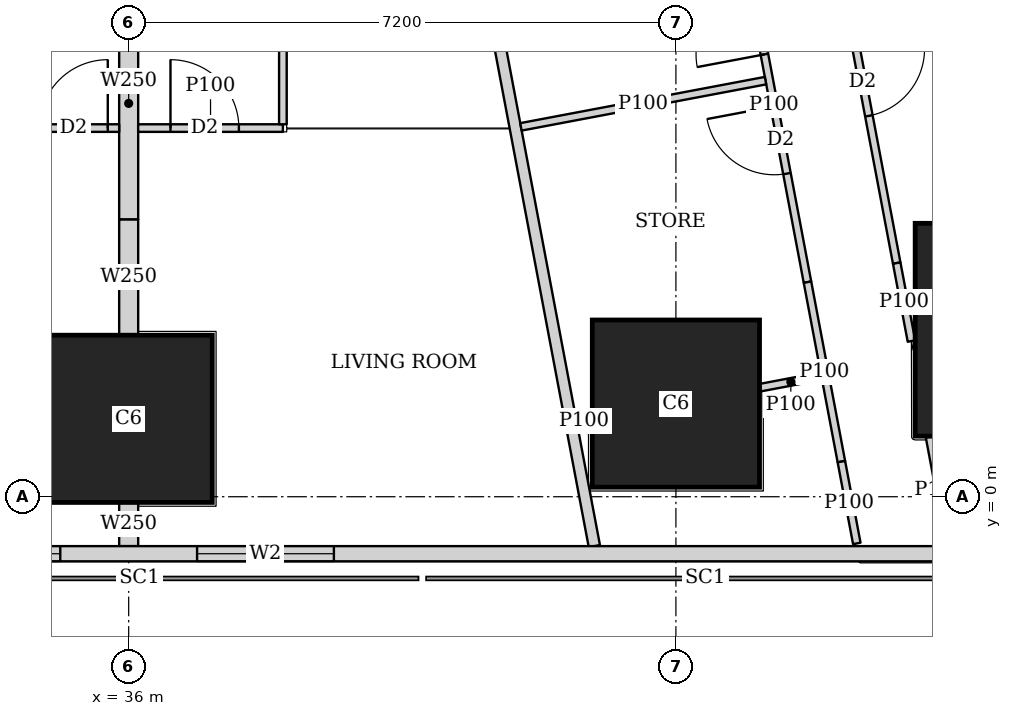
"""IFC4 building model, lengths in metres.
Left out: names, types, materials, properties, quantities, classifications, styles, units other than length and angle.
Written with IfcOpenShell. Run it as: python <this file> out.ifc"""

import sys

from ifc_helpers import new_model, si_unit, direction, frame, frame_2d, origin, origin_2d, place, context, subcontext, project, spatial, rectangle, extrude, element, fill, save


model = new_model("IFC4")
c1 = context("Model", 3, precision=1e-05, world=origin(), true_north=direction((0.0, 1.0)))
c2 = subcontext(c1, "Body", "Model", "MODEL_VIEW")
j1 = project(units=[si_unit("LENGTHUNIT", "METRE"), si_unit("PLANEANGLEUNIT", "RADIAN")], contexts=[c1])
p1 = place(None, origin())
s1 = spatial("IfcSite", under=j1, at=p1, CompositionType="ELEMENT")
p2 = place(p1, origin())
s2 = spatial("IfcBuilding", under=s1, at=p2, CompositionType="ELEMENT")
p3 = place(p2, frame((0.0, 0.0, 122.9)))
s3 = spatial("IfcBuildingStorey", under=s2, at=p3, CompositionType="ELEMENT", Elevation=122.9)
for number, where, z_axis, x_axis in (
    (1, (36.0, 1.025, 0.0), (0.0, 0.0, 1.0), (1.0, 0.0, 0.0)),
    (2, (43.2, 1.225, 0.0), (0.0, 0.0, 1.0), (1.0, 0.0, 0.0)),
):
    element("IfcColumn", number, at=place(p3, frame(where, z_axis=z_axis, x_axis=x_axis)), inside=s3, PredefinedType="COLUMN", context=c2, shape_type="SweptSolid", body=[
        extrude(rectangle(XDim=2.2, YDim=2.2, at=origin_2d()), origin(), (0.0, 0.0, 1.0), 3.75),
    ])
p4 = place(p3, frame((47.748, 2.197, 0.0), z_axis=(0.0, 0.0, 1.0), x_axis=(1.0, 0.0, 0.0)))
e3 = element("IfcColumn", 3, at=p4, inside=s3, PredefinedType="COLUMN", context=c2, shape_type="SweptSolid", body=[
    extrude(rectangle(XDim=2.8, YDim=2.8, at=origin_2d()), origin(), (0.0, 0.0, 1.0), 3.75),
])
p5 = place(p3, frame((2.163, -0.75, 0.0), z_axis=(0.0, 0.0, 1.0), x_axis=(1.0, 0.0, 0.0)))
e4 = element("IfcWall", 4, at=p5, inside=s3, PredefinedType="SOLIDWALL", context=c2, shape_type="SweptSolid", body=[
    extrude(rectangle(XDim=45.628, YDim=0.2, at=frame_2d((22.814, 0.0))), origin(), (0.0, 0.0, 1.0), 3.5),
])
p6 = place(p5, frame((9.537, 0.0, 0.9)))
e5 = element("IfcOpeningElement", 5, at=p6, cuts=e4, PredefinedType="OPENING", context=c2, shape_type="SweptSolid", body=[
    extrude(rectangle(XDim=1.8, YDim=1.5, at=frame_2d((0.9, 0.75))), frame((0.0, 0.11, 0.0), z_axis=(0.0, -1.0, 0.0), x_axis=(1.0, 0.0, 0.0)), (0.0, 0.0, 1.0), 0.22),
])
p7 = place(p5, frame((13.137, 0.0, 0.9)))
e6 = element("IfcOpeningElement", 6, at=p7, cuts=e4, PredefinedType="OPENING", context=c2, shape_type="SweptSolid", body=[
    extrude(rectangle(XDim=1.8, YDim=1.5, at=frame_2d((0.9, 0.75))), frame((0.0, 0.11, 0.0), z_axis=(0.0, -1.0, 0.0), x_axis=(1.0, 0.0, 0.0)), (0.0, 0.0, 1.0), 0.22),
])
p8 = place(p5, frame((16.737, 0.0, 0.9)))
e7 = element("IfcOpeningElement", 7, at=p8, cuts=e4, PredefinedType="OPENING", context=c2, shape_type="SweptSolid", body=[
    extrude(rectangle(XDim=1.8, YDim=1.5, at=frame_2d((0.9, 0.75))), frame((0.0, 0.11, 0.0), z_axis=(0.0, -1.0, 0.0), x_axis=(1.0, 0.0, 0.0)), (0.0, 0.0, 1.0), 0.22),
])
p9 = place(p5, frame((20.337, 0.0, 0.9)))
e8 = element("IfcOpeningElement", 8, at=p9, cuts=e4, PredefinedType="OPENING", context=c2, shape_type="SweptSolid", body=[
    extrude(rectangle(XDim=1.8, YDim=1.5, at=frame_2d((0.9, 0.75))), frame((0.0, 0.11, 0.0), z_axis=(0.0, -1.0, 0.0), x_axis=(1.0, 0.0, 0.0)), (0.0, 0.0, 1.0), 0.22),
])
p10 = place(p5, frame((23.937, 0.0, 0.9)))
e9 = element("IfcOpeningElement", 9, at=p10, cuts=e4, PredefinedType="OPENING", context=c2, shape_type="SweptSolid", body=[
    extrude(rectangle(XDim=1.8, YDim=1.5, at=frame_2d((0.9, 0.75))), frame((0.0, 0.11, 0.0), z_axis=(0.0, -1.0, 0.0), x_axis=(1.0, 0.0, 0.0)), (0.0, 0.0, 1.0), 0.22),
])
p11 = place(p5, frame((27.537, 0.0, 0.9)))
e10 = element("IfcOpeningElement", 10, at=p11, cuts=e4, PredefinedType="OPENING", context=c2, shape_type="SweptSolid", body=[
    extrude(rectangle(XDim=1.8, YDim=1.5, at=frame_2d((0.9, 0.75))), frame((0.0, 0.11, 0.0), z_axis=(0.0, -1.0, 0.0), x_axis=(1.0, 0.0, 0.0)), (0.0, 0.0, 1.0), 0.22),
])
p12 = place(p5, frame((31.137, 0.0, 0.9)))
e11 = element("IfcOpeningElement", 11, at=p12, cuts=e4, PredefinedType="OPENING", context=c2, shape_type="SweptSolid", body=[
    extrude(rectangle(XDim=1.8, YDim=1.5, at=frame_2d((0.9, 0.75))), frame((0.0, 0.11, 0.0), z_axis=(0.0, -1.0, 0.0), x_axis=(1.0, 0.0, 0.0)), (0.0, 0.0, 1.0), 0.22),
])
p13 = place(p5, frame((34.737, 0.0, 0.9)))
e12 = element("IfcOpeningElement", 12, at=p13, cuts=e4, PredefinedType="OPENING", context=c2, shape_type="SweptSolid", body=[
    extrude(rectangle(XDim=1.8, YDim=1.5, at=frame_2d((0.9, 0.75))), frame((0.0, 0.11, 0.0), z_axis=(0.0, -1.0, 0.0), x_axis=(1.0, 0.0, 0.0)), (0.0, 0.0, 1.0), 0.22),
])
p14 = place(p3, frame((50.653, 2.703, 0.0), z_axis=(0.0, 0.0, 1.0), x_axis=(-0.185612026696, 0.982623109613, 0.0)))
e13 = element("IfcWall", 13, at=p14, inside=s3, PredefinedType="SOLIDWALL", context=c2, shape_type="SweptSolid", body=[
    extrude(rectangle(XDim=41.393, YDim=0.2, at=frame_2d((20.697, 0.0))), origin(), (0.0, 0.0, 1.0), 3.5),
])
p15 = place(p14, frame((1.633, 0.0, 0.9)))
e14 = element("IfcOpeningElement", 14, at=p15, cuts=e13, PredefinedType="OPENING", context=c2, shape_type="SweptSolid", body=[
    extrude(rectangle(XDim=1.8, YDim=1.5, at=frame_2d((0.9, 0.75))), frame((0.0, 0.11, 0.0), z_axis=(0.0, -1.0, 0.0), x_axis=(1.0, 0.0, 0.0)), (0.0, 0.0, 1.0), 0.22),
])
p16 = place(p14, frame((6.032, 0.0, 0.9)))
e15 = element("IfcOpeningElement", 15, at=p16, cuts=e13, PredefinedType="OPENING", context=c2, shape_type="SweptSolid", body=[
    extrude(rectangle(XDim=1.8, YDim=1.5, at=frame_2d((0.9, 0.75))), frame((0.0, 0.11, 0.0), z_axis=(0.0, -1.0, 0.0), x_axis=(1.0, 0.0, 0.0)), (0.0, 0.0, 1.0), 0.22),
])
p17 = place(p14, frame((9.848, 0.0, 0.9)))
e16 = element("IfcOpeningElement", 16, at=p17, cuts=e13, PredefinedType="OPENING", context=c2, shape_type="SweptSolid", body=[
    extrude(rectangle(XDim=1.8, YDim=1.5, at=frame_2d((0.9, 0.75))), frame((0.0, 0.11, 0.0), z_axis=(0.0, -1.0, 0.0), x_axis=(1.0, 0.0, 0.0)), (0.0, 0.0, 1.0), 0.22),
])
p18 = place(p14, frame((13.664, 0.0, 0.9)))
e17 = element("IfcOpeningElement", 17, at=p18, cuts=e13, PredefinedType="OPENING", context=c2, shape_type="SweptSolid", body=[
    extrude(rectangle(XDim=1.8, YDim=1.5, at=frame_2d((0.9, 0.75))), frame((0.0, 0.11, 0.0), z_axis=(0.0, -1.0, 0.0), x_axis=(1.0, 0.0, 0.0)), (0.0, 0.0, 1.0), 0.22),
])
p19 = place(p14, frame((17.481, 0.0, 0.9)))
e18 = element("IfcOpeningElement", 18, at=p19, cuts=e13, PredefinedType="OPENING", context=c2, shape_type="SweptSolid", body=[
    extrude(rectangle(XDim=1.8, YDim=1.5, at=frame_2d((0.9, 0.75))), frame((0.0, 0.11, 0.0), z_axis=(0.0, -1.0, 0.0), x_axis=(1.0, 0.0, 0.0)), (0.0, 0.0, 1.0), 0.22),
])
p20 = place(p14, frame((21.297, 0.0, 0.9)))
e19 = element("IfcOpeningElement", 19, at=p20, cuts=e13, PredefinedType="OPENING", context=c2, shape_type="SweptSolid", body=[
    extrude(rectangle(XDim=1.8, YDim=1.5, at=frame_2d((0.9, 0.75))), frame((0.0, 0.11, 0.0), z_axis=(0.0, -1.0, 0.0), x_axis=(1.0, 0.0, 0.0)), (0.0, 0.0, 1.0), 0.22),
])
p21 = place(p14, frame((25.113, 0.0, 0.9)))
e20 = element("IfcOpeningElement", 20, at=p21, cuts=e13, PredefinedType="OPENING", context=c2, shape_type="SweptSolid", body=[
    extrude(rectangle(XDim=1.8, YDim=1.5, at=frame_2d((0.9, 0.75))), frame((0.0, 0.11, 0.0), z_axis=(0.0, -1.0, 0.0), x_axis=(1.0, 0.0, 0.0)), (0.0, 0.0, 1.0), 0.22),
])
p22 = place(p14, frame((28.93, 0.0, 0.9)))
e21 = element("IfcOpeningElement", 21, at=p22, cuts=e13, PredefinedType="OPENING", context=c2, shape_type="SweptSolid", body=[
    extrude(rectangle(XDim=1.8, YDim=1.5, at=frame_2d((0.9, 0.75))), frame((0.0, 0.11, 0.0), z_axis=(0.0, -1.0, 0.0), x_axis=(1.0, 0.0, 0.0)), (0.0, 0.0, 1.0), 0.22),
])
p23 = place(p14, frame((32.746, 0.0, 0.9)))
e22 = element("IfcOpeningElement", 22, at=p23, cuts=e13, PredefinedType="OPENING", context=c2, shape_type="SweptSolid", body=[
    extrude(rectangle(XDim=1.8, YDim=1.5, at=frame_2d((0.9, 0.75))), frame((0.0, 0.11, 0.0), z_axis=(0.0, -1.0, 0.0), x_axis=(1.0, 0.0, 0.0)), (0.0, 0.0, 1.0), 0.22),
])
p24 = place(p14, frame((36.481, 0.0, 0.9)))
e23 = element("IfcOpeningElement", 23, at=p24, cuts=e13, PredefinedType="OPENING", context=c2, shape_type="SweptSolid", body=[
    extrude(rectangle(XDim=1.8, YDim=1.5, at=frame_2d((0.9, 0.75))), frame((0.0, 0.11, 0.0), z_axis=(0.0, -1.0, 0.0), x_axis=(1.0, 0.0, 0.0)), (0.0, 0.0, 1.0), 0.22),
])
p25 = place(p3, frame((33.382, 45.65, 0.0), z_axis=(0.0, 0.0, 1.0), x_axis=(0.185593544777, -0.982626600565, 0.0)))
e24 = element("IfcWall", 24, at=p25, inside=s3, PredefinedType="SOLIDWALL", context=c2, shape_type="SweptSolid", body=[
    extrude(rectangle(XDim=47.118, YDim=0.15, at=frame_2d((23.559, 0.0))), origin(), (0.0, 0.0, 1.0), 2.2),
])
p26 = place(p25, frame((10.662, 0.0, 0.0)))
e25 = element("IfcOpeningElement", 25, at=p26, cuts=e24, PredefinedType="OPENING", context=c2, shape_type="SweptSolid", body=[
    extrude(rectangle(XDim=1.0, YDim=2.1, at=frame_2d((0.5, 1.05))), frame((0.0, 0.085, 0.0), z_axis=(0.0, -1.0, 0.0), x_axis=(1.0, 0.0, 0.0)), (0.0, 0.0, 1.0), 0.17),
])
p27 = place(p25, frame((15.237, 0.0, 0.0)))
e26 = element("IfcOpeningElement", 26, at=p27, cuts=e24, PredefinedType="OPENING", context=c2, shape_type="SweptSolid", body=[
    extrude(rectangle(XDim=1.0, YDim=2.1, at=frame_2d((0.5, 1.05))), frame((0.0, 0.085, 0.0), z_axis=(0.0, -1.0, 0.0), x_axis=(1.0, 0.0, 0.0)), (0.0, 0.0, 1.0), 0.17),
])
p28 = place(p25, frame((22.87, 0.0, 0.0)))
e27 = element("IfcOpeningElement", 27, at=p28, cuts=e24, PredefinedType="OPENING", context=c2, shape_type="SweptSolid", body=[
    extrude(rectangle(XDim=1.0, YDim=2.1, at=frame_2d((0.5, 1.05))), frame((0.0, 0.085, 0.0), z_axis=(0.0, -1.0, 0.0), x_axis=(1.0, 0.0, 0.0)), (0.0, 0.0, 1.0), 0.17),
])
p29 = place(p25, frame((33.833, 0.0, 0.0)))
e28 = element("IfcOpeningElement", 28, at=p29, cuts=e24, PredefinedType="OPENING", context=c2, shape_type="SweptSolid", body=[
    extrude(rectangle(XDim=1.0, YDim=2.1, at=frame_2d((0.5, 1.05))), frame((0.0, 0.085, 0.0), z_axis=(0.0, -1.0, 0.0), x_axis=(1.0, 0.0, 0.0)), (0.0, 0.0, 1.0), 0.17),
])
p30 = place(p3, frame((35.875, 4.85, 0.0), z_axis=(0.0, 0.0, 1.0), x_axis=(-1.0, 0.0, 0.0)))
e29 = element("IfcWall", 29, at=p30, inside=s3, PredefinedType="PARTITIONING", context=c2, shape_type="SweptSolid", body=[
    extrude(rectangle(XDim=3.475, YDim=0.1, at=frame_2d((1.738, 0.0))), origin(), (0.0, 0.0, 1.0), 3.5),
])
p31 = place(p30, frame((1.92, 0.0, 0.0)))
e30 = element("IfcOpeningElement", 30, at=p31, cuts=e29, PredefinedType="OPENING", context=c2, shape_type="SweptSolid", body=[
    extrude(rectangle(XDim=0.9, YDim=2.1, at=frame_2d((0.45, 1.05))), frame((0.0, 0.06, 0.0), z_axis=(0.0, -1.0, 0.0), x_axis=(1.0, 0.0, 0.0)), (0.0, 0.0, 1.0), 0.12),
])
p32 = place(p30, frame((0.15, 0.0, 0.0)))
e31 = element("IfcOpeningElement", 31, at=p32, cuts=e29, PredefinedType="OPENING", context=c2, shape_type="SweptSolid", body=[
    extrude(rectangle(XDim=0.9, YDim=2.1, at=frame_2d((0.45, 1.05))), frame((0.0, 0.06, 0.0), z_axis=(0.0, -1.0, 0.0), x_axis=(1.0, 0.0, 0.0)), (0.0, 0.0, 1.0), 0.12),
])
p33 = place(p3, frame((38.029, 4.85, 0.0), z_axis=(0.0, 0.0, 1.0), x_axis=(-1.0, 0.0, 0.0)))
e32 = element("IfcWall", 32, at=p33, inside=s3, PredefinedType="PARTITIONING", context=c2, shape_type="SweptSolid", body=[
    extrude(rectangle(XDim=1.904, YDim=0.1, at=frame_2d((0.952, 0.0))), origin(), (0.0, 0.0, 1.0), 3.5),
])
p34 = place(p33, frame((0.579, 0.0, 0.0)))
e33 = element("IfcOpeningElement", 33, at=p34, cuts=e32, PredefinedType="OPENING", context=c2, shape_type="SweptSolid", body=[
    extrude(rectangle(XDim=0.9, YDim=2.1, at=frame_2d((0.45, 1.05))), frame((0.0, 0.06, 0.0), z_axis=(0.0, -1.0, 0.0), x_axis=(1.0, 0.0, 0.0)), (0.0, 0.0, 1.0), 0.12),
])
p35 = place(p3, frame((38.029, 4.9, 0.0), z_axis=(0.0, 0.0, 1.0), x_axis=(0.0, 1.0, 0.0)))
e34 = element("IfcWall", 34, at=p35, inside=s3, PredefinedType="PARTITIONING", context=c2, shape_type="SweptSolid", body=[
    extrude(rectangle(XDim=3.275, YDim=0.1, at=frame_2d((1.638, 0.0))), origin(), (0.0, 0.0, 1.0), 3.5),
])
p36 = place(p3, frame((36.0, -0.65, 0.0), z_axis=(0.0, 0.0, 1.0), x_axis=(0.0, 1.0, 0.0)))
e35 = element("IfcWall", 35, at=p36, inside=s3, PredefinedType="SOLIDWALL", context=c2, shape_type="SweptSolid", body=[
    extrude(rectangle(XDim=0.574, YDim=0.25, at=frame_2d((0.287, 0.0))), origin(), (0.0, 0.0, 1.0), 3.5),
])
p37 = place(p3, frame((36.0, 2.126, 0.0), z_axis=(0.0, 0.0, 1.0), x_axis=(0.0, 1.0, 0.0)))
e36 = element("IfcWall", 36, at=p37, inside=s3, PredefinedType="SOLIDWALL", context=c2, shape_type="SweptSolid", body=[
    extrude(rectangle(XDim=1.524, YDim=0.25, at=frame_2d((0.762, 0.0))), origin(), (0.0, 0.0, 1.0), 3.5),
])
p38 = place(p3, frame((36.0, 3.65, 0.0), z_axis=(0.0, 0.0, 1.0), x_axis=(0.0, 1.0, 0.0)))
e37 = element("IfcWall", 37, at=p38, inside=s3, PredefinedType="SOLIDWALL", context=c2, shape_type="SweptSolid", body=[
    extrude(rectangle(XDim=3.049, YDim=0.25, at=frame_2d((1.524, 0.0))), origin(), (0.0, 0.0, 1.0), 3.5),
])
p39 = place(p3, frame((44.727, 10.366, 0.0), z_axis=(0.0, 0.0, 1.0), x_axis=(0.185678775129, -0.982610498858, 0.0)))
e38 = element("IfcWall", 38, at=p39, inside=s3, PredefinedType="PARTITIONING", context=c2, shape_type="SweptSolid", body=[
    extrude(rectangle(XDim=7.421, YDim=0.1, at=frame_2d((3.71, 0.0))), origin(), (0.0, 0.0, 1.0), 3.5),
])
p40 = place(p39, frame((0.151, 0.0, 0.0)))
e39 = element("IfcOpeningElement", 39, at=p40, cuts=e38, PredefinedType="OPENING", context=c2, shape_type="SweptSolid", body=[
    extrude(rectangle(XDim=0.9, YDim=2.1, at=frame_2d((0.45, 1.05))), frame((0.0, 0.06, 0.0), z_axis=(0.0, -1.0, 0.0), x_axis=(1.0, 0.0, 0.0)), (0.0, 0.0, 1.0), 0.12),
])
p41 = place(p39, frame((4.55, 0.0, 0.0)))
e40 = element("IfcOpeningElement", 40, at=p41, cuts=e38, PredefinedType="OPENING", context=c2, shape_type="SweptSolid", body=[
    extrude(rectangle(XDim=0.9, YDim=2.1, at=frame_2d((0.45, 1.05))), frame((0.0, 0.06, 0.0), z_axis=(0.0, -1.0, 0.0), x_axis=(1.0, 0.0, 0.0)), (0.0, 0.0, 1.0), 0.12),
])
p42 = place(p3, frame((46.105, 3.074, 0.0), z_axis=(0.0, 0.0, 1.0), x_axis=(0.185897769544, -0.982569091351, 0.0)))
e41 = element("IfcWall", 41, at=p42, inside=s3, PredefinedType="PARTITIONING", context=c2, shape_type="SweptSolid", body=[
    extrude(rectangle(XDim=1.044, YDim=0.1, at=frame_2d((0.522, 0.0))), origin(), (0.0, 0.0, 1.0), 2.05),
])
p43 = place(p3, frame((46.537, 0.787, 0.0), z_axis=(0.0, 0.0, 1.0), x_axis=(0.185348284603, -0.982672892368, 0.0)))
e42 = element("IfcWall", 42, at=p43, inside=s3, PredefinedType="PARTITIONING", context=c2, shape_type="SweptSolid", body=[
    extrude(rectangle(XDim=1.419, YDim=0.1, at=frame_2d((0.709, 0.0))), origin(), (0.0, 0.0, 1.0), 2.05),
])
p44 = place(p3, frame((44.049, 7.49, 0.0), z_axis=(0.0, 0.0, 1.0), x_axis=(0.185666332607, -0.982612849975, 0.0)))
e43 = element("IfcWall", 43, at=p44, inside=s3, PredefinedType="PARTITIONING", context=c2, shape_type="SweptSolid", body=[
    extrude(rectangle(XDim=4.75, YDim=0.1, at=frame_2d((2.375, 0.0))), origin(), (0.0, 0.0, 1.0), 3.5),
])
p45 = place(p44, frame((0.8, 0.0, 0.0)))
e44 = element("IfcOpeningElement", 44, at=p45, cuts=e43, PredefinedType="OPENING", context=c2, shape_type="SweptSolid", body=[
    extrude(rectangle(XDim=0.9, YDim=2.1, at=frame_2d((0.45, 1.05))), frame((0.0, 0.06, 0.0), z_axis=(0.0, -1.0, 0.0), x_axis=(1.0, 0.0, 0.0)), (0.0, 0.0, 1.0), 0.12),
])
p46 = place(p44, frame((2.396, 0.0, 0.0)))
e45 = element("IfcOpeningElement", 45, at=p46, cuts=e43, PredefinedType="OPENING", context=c2, shape_type="SweptSolid", body=[
    extrude(rectangle(XDim=0.9, YDim=2.1, at=frame_2d((0.45, 1.05))), frame((0.0, 0.06, 0.0), z_axis=(0.0, -1.0, 0.0), x_axis=(1.0, 0.0, 0.0)), (0.0, 0.0, 1.0), 0.12),
])
p47 = place(p3, frame((44.931, 2.823, 0.0), z_axis=(0.0, 0.0, 1.0), x_axis=(0.185631845838, -0.982619365681, 0.0)))
e46 = element("IfcWall", 46, at=p47, inside=s3, PredefinedType="PARTITIONING", context=c2, shape_type="SweptSolid", body=[
    extrude(rectangle(XDim=2.403, YDim=0.1, at=frame_2d((1.201, 0.0))), origin(), (0.0, 0.0, 1.0), 2.05),
])
p48 = place(p3, frame((45.377, 0.462, 0.0), z_axis=(0.0, 0.0, 1.0), x_axis=(0.185513480919, -0.982641719243, 0.0)))
e47 = element("IfcWall", 47, at=p48, inside=s3, PredefinedType="PARTITIONING", context=c2, shape_type="SweptSolid", body=[
    extrude(rectangle(XDim=1.095, YDim=0.1, at=frame_2d((0.547, 0.0))), origin(), (0.0, 0.0, 1.0), 3.5),
])
p49 = place(p3, frame((45.114, 1.587, 0.0), z_axis=(0.0, 0.0, 1.0), x_axis=(-0.982624706348, -0.185603573443, 0.0)))
e48 = element("IfcWall", 48, at=p49, inside=s3, PredefinedType="PARTITIONING", context=c2, shape_type="SweptSolid", body=[
    extrude(rectangle(XDim=0.818, YDim=0.1, at=frame_2d((0.409, 0.0))), origin(), (0.0, 0.0, 1.0), 2.05),
])
p50 = place(p3, frame((42.09, 1.016, 0.0), z_axis=(0.0, 0.0, 1.0), x_axis=(-0.982208563973, -0.187793335502, 0.0)))
e49 = element("IfcWall", 49, at=p50, inside=s3, PredefinedType="PARTITIONING", context=c2, shape_type="SweptSolid", body=[
    extrude(rectangle(XDim=0.198, YDim=0.1, at=frame_2d((0.099, 0.0))), origin(), (0.0, 0.0, 1.0), 2.05),
])
p51 = place(p3, frame((44.379, 5.474, 0.0), z_axis=(0.0, 0.0, 1.0), x_axis=(-0.982607026909, -0.185697147715, 0.0)))
e50 = element("IfcWall", 50, at=p51, inside=s3, PredefinedType="PARTITIONING", context=c2, shape_type="SweptSolid", body=[
    extrude(rectangle(XDim=3.275, YDim=0.1, at=frame_2d((1.637, 0.0))), origin(), (0.0, 0.0, 1.0), 3.5),
])
p52 = place(p12, origin())
e51 = element("IfcWindow", 51, at=p52, inside=s3, PartitioningType="SINGLE_PANEL", PredefinedType="WINDOW", context=c2, shape_type="SweptSolid", body=[
    extrude(rectangle(XDim=1.8, YDim=1.5, at=frame_2d((0.9, 0.75))), frame((0.0, 0.03, 0.0), z_axis=(0.0, -1.0, 0.0), x_axis=(1.0, 0.0, 0.0)), (0.0, 0.0, 1.0), 0.06),
])
fill(e11, e51)
p53 = place(p13, origin())
e52 = element("IfcWindow", 52, at=p53, inside=s3, PartitioningType="SINGLE_PANEL", PredefinedType="WINDOW", context=c2, shape_type="SweptSolid", body=[
    extrude(rectangle(XDim=1.8, YDim=1.5, at=frame_2d((0.9, 0.75))), frame((0.0, 0.03, 0.0), z_axis=(0.0, -1.0, 0.0), x_axis=(1.0, 0.0, 0.0)), (0.0, 0.0, 1.0), 0.06),
])
fill(e12, e52)
p54 = place(p32, origin())
e53 = element("IfcDoor", 53, at=p54, inside=s3, OperationType="SINGLE_SWING_RIGHT", PredefinedType="DOOR", context=c2, shape_type="SweptSolid", body=[
    extrude(rectangle(XDim=0.9, YDim=2.1, at=frame_2d((0.45, 1.05))), frame((0.0, 0.025, 0.0), z_axis=(0.0, -1.0, 0.0), x_axis=(1.0, 0.0, 0.0)), (0.0, 0.0, 1.0), 0.05),
])
fill(e31, e53)
p55 = place(p34, origin())
e54 = element("IfcDoor", 54, at=p55, inside=s3, OperationType="SINGLE_SWING_LEFT", PredefinedType="DOOR", context=c2, shape_type="SweptSolid", body=[
    extrude(rectangle(XDim=0.9, YDim=2.1, at=frame_2d((0.45, 1.05))), frame((0.0, 0.025, 0.0), z_axis=(0.0, -1.0, 0.0), x_axis=(1.0, 0.0, 0.0)), (0.0, 0.0, 1.0), 0.05),
])
fill(e33, e54)
p56 = place(p41, origin())
e55 = element("IfcDoor", 55, at=p56, inside=s3, OperationType="SINGLE_SWING_LEFT", PredefinedType="DOOR", context=c2, shape_type="SweptSolid", body=[
    extrude(rectangle(XDim=0.9, YDim=2.1, at=frame_2d((0.45, 1.05))), frame((0.0, 0.025, 0.0), z_axis=(0.0, -1.0, 0.0), x_axis=(1.0, 0.0, 0.0)), (0.0, 0.0, 1.0), 0.05),
])
fill(e40, e55)
p57 = place(p45, origin())
e56 = element("IfcDoor", 56, at=p57, inside=s3, OperationType="SINGLE_SWING_LEFT", PredefinedType="DOOR", context=c2, shape_type="SweptSolid", body=[
    extrude(rectangle(XDim=0.9, YDim=2.1, at=frame_2d((0.45, 1.05))), frame((0.0, 0.025, 0.0), z_axis=(0.0, -1.0, 0.0), x_axis=(1.0, 0.0, 0.0)), (0.0, 0.0, 1.0), 0.05),
])
fill(e44, e56)
p58 = place(p46, origin())
e57 = element("IfcDoor", 57, at=p58, inside=s3, OperationType="SINGLE_SWING_RIGHT", PredefinedType="DOOR", context=c2, shape_type="SweptSolid", body=[
    extrude(rectangle(XDim=0.9, YDim=2.1, at=frame_2d((0.45, 1.05))), frame((0.0, 0.025, 0.0), z_axis=(0.0, -1.0, 0.0), x_axis=(1.0, 0.0, 0.0)), (0.0, 0.0, 1.0), 0.05),
])
fill(e45, e57)
save(model, sys.argv[1])
